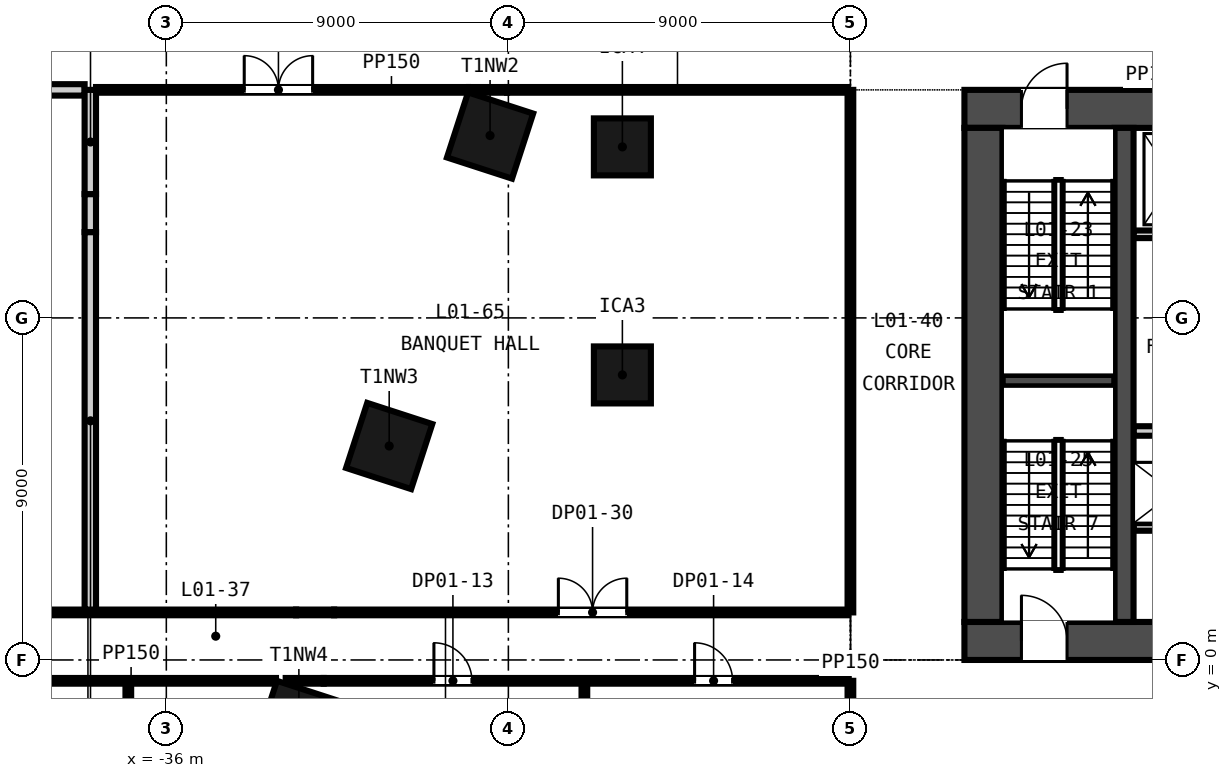
"""IFC4 building model, lengths in metres.
Left out: names, types, materials, properties, quantities, classifications, styles, units other than length and angle.
Written with IfcOpenShell. Run it as: python <this file> out.ifc"""

import sys

from ifc_helpers import new_model, si_unit, direction, frame, frame_2d, origin, origin_2d, place, context, subcontext, project, spatial, rectangle, extrude, element, fill, save


model = new_model("IFC4")
c1 = context("Model", 3, precision=1e-05, world=origin(), true_north=direction((0.0, 1.0)))
c2 = subcontext(c1, "Body", "Model", "MODEL_VIEW")
j1 = project(units=[si_unit("LENGTHUNIT", "METRE"), si_unit("PLANEANGLEUNIT", "RADIAN")], contexts=[c1])
p1 = place(None, origin())
s1 = spatial("IfcSite", under=j1, at=p1, CompositionType="ELEMENT")
p2 = place(p1, origin())
s2 = spatial("IfcBuilding", under=s1, at=p2, CompositionType="ELEMENT")
p3 = place(p2, frame((0.0, 0.0, 9.0)))
s3 = spatial("IfcBuildingStorey", under=s2, at=p3, CompositionType="ELEMENT", Elevation=9.0)
p4 = place(p3, frame((-15.0, 0.5, -0.4), z_axis=(0.0, 0.0, 1.0), x_axis=(1.0, 0.0, 0.0)))
e1 = element("IfcWall", 1, at=p4, inside=s3, PredefinedType="SOLIDWALL", context=c2, shape_type="SweptSolid", body=[
    extrude(rectangle(XDim=30.0, YDim=1.0, at=frame_2d((15.0, 0.0))), origin(), (0.0, 0.0, 1.0), 9.0),
])
p5 = place(p4, frame((5.8, 0.0, 0.4)))
e2 = element("IfcOpeningElement", 2, at=p5, cuts=e1, PredefinedType="OPENING", context=c2, shape_type="SweptSolid", body=[
    extrude(rectangle(XDim=2.4, YDim=2.4, at=frame_2d((1.2, 1.2))), frame((0.0, 0.51, 0.0), z_axis=(0.0, -1.0, 0.0), x_axis=(1.0, 0.0, 0.0)), (0.0, 0.0, 1.0), 1.02),
])
p6 = place(p4, frame((13.8, 0.0, 0.4)))
e3 = element("IfcOpeningElement", 3, at=p6, cuts=e1, PredefinedType="OPENING", context=c2, shape_type="SweptSolid", body=[
    extrude(rectangle(XDim=2.4, YDim=2.4, at=frame_2d((1.2, 1.2))), frame((0.0, 0.51, 0.0), z_axis=(0.0, -1.0, 0.0), x_axis=(1.0, 0.0, 0.0)), (0.0, 0.0, 1.0), 1.02),
])
p7 = place(p4, frame((21.8, 0.0, 0.4)))
e4 = element("IfcOpeningElement", 4, at=p7, cuts=e1, PredefinedType="OPENING", context=c2, shape_type="SweptSolid", body=[
    extrude(rectangle(XDim=2.4, YDim=2.4, at=frame_2d((1.2, 1.2))), frame((0.0, 0.51, 0.0), z_axis=(0.0, -1.0, 0.0), x_axis=(1.0, 0.0, 0.0)), (0.0, 0.0, 1.0), 1.02),
])
p8 = place(p4, frame((1.5, 0.0, 0.4)))
e5 = element("IfcOpeningElement", 5, at=p8, cuts=e1, PredefinedType="OPENING", context=c2, shape_type="SweptSolid", body=[
    extrude(rectangle(XDim=1.2, YDim=2.1, at=frame_2d((0.6, 1.05))), frame((0.0, 0.51, 0.0), z_axis=(0.0, -1.0, 0.0), x_axis=(1.0, 0.0, 0.0)), (0.0, 0.0, 1.0), 1.02),
])
p9 = place(p4, frame((27.3, 0.0, 0.4)))
e6 = element("IfcOpeningElement", 6, at=p9, cuts=e1, PredefinedType="OPENING", context=c2, shape_type="SweptSolid", body=[
    extrude(rectangle(XDim=1.2, YDim=2.1, at=frame_2d((0.6, 1.05))), frame((0.0, 0.51, 0.0), z_axis=(0.0, -1.0, 0.0), x_axis=(1.0, 0.0, 0.0)), (0.0, 0.0, 1.0), 1.02),
])
p10 = place(p3, frame((-15.0, 14.5, -0.4), z_axis=(0.0, 0.0, 1.0), x_axis=(1.0, 0.0, 0.0)))
e7 = element("IfcWall", 7, at=p10, inside=s3, PredefinedType="SOLIDWALL", context=c2, shape_type="SweptSolid", body=[
    extrude(rectangle(XDim=30.0, YDim=1.0, at=frame_2d((15.0, 0.0))), origin(), (0.0, 0.0, 1.0), 9.0),
])
p11 = place(p10, frame((9.25, 0.0, 0.4)))
e8 = element("IfcOpeningElement", 8, at=p11, cuts=e7, PredefinedType="OPENING", context=c2, shape_type="SweptSolid", body=[
    extrude(rectangle(XDim=1.5, YDim=2.1, at=frame_2d((0.75, 1.05))), frame((0.0, 0.51, 0.0), z_axis=(0.0, -1.0, 0.0), x_axis=(1.0, 0.0, 0.0)), (0.0, 0.0, 1.0), 1.02),
])
p12 = place(p10, frame((19.4, 0.0, 0.4)))
e9 = element("IfcOpeningElement", 9, at=p12, cuts=e7, PredefinedType="OPENING", context=c2, shape_type="SweptSolid", body=[
    extrude(rectangle(XDim=1.5, YDim=2.1, at=frame_2d((0.75, 1.05))), frame((0.0, 0.51, 0.0), z_axis=(0.0, -1.0, 0.0), x_axis=(1.0, 0.0, 0.0)), (0.0, 0.0, 1.0), 1.02),
])
p13 = place(p10, frame((1.5, 0.0, 0.4)))
e10 = element("IfcOpeningElement", 10, at=p13, cuts=e7, PredefinedType="OPENING", context=c2, shape_type="SweptSolid", body=[
    extrude(rectangle(XDim=1.2, YDim=2.1, at=frame_2d((0.6, 1.05))), frame((0.0, 0.51, 0.0), z_axis=(0.0, -1.0, 0.0), x_axis=(1.0, 0.0, 0.0)), (0.0, 0.0, 1.0), 1.02),
])
p14 = place(p10, frame((27.3, 0.0, 0.4)))
e11 = element("IfcOpeningElement", 11, at=p14, cuts=e7, PredefinedType="OPENING", context=c2, shape_type="SweptSolid", body=[
    extrude(rectangle(XDim=1.2, YDim=2.1, at=frame_2d((0.6, 1.05))), frame((0.0, 0.51, 0.0), z_axis=(0.0, -1.0, 0.0), x_axis=(1.0, 0.0, 0.0)), (0.0, 0.0, 1.0), 1.02),
])
p15 = place(p3, frame((-14.5, 1.0, -0.4), z_axis=(0.0, 0.0, 1.0), x_axis=(0.0, 1.0, 0.0)))
e12 = element("IfcWall", 12, at=p15, inside=s3, PredefinedType="SOLIDWALL", context=c2, shape_type="SweptSolid", body=[
    extrude(rectangle(XDim=13.0, YDim=1.0, at=frame_2d((6.5, 0.0))), origin(), (0.0, 0.0, 1.0), 9.0),
])
p16 = place(p3, frame((-10.8, 1.0, -0.4), z_axis=(0.0, 0.0, 1.0), x_axis=(0.0, 1.0, 0.0)))
e13 = element("IfcWall", 13, at=p16, inside=s3, PredefinedType="SOLIDWALL", context=c2, shape_type="SweptSolid", body=[
    extrude(rectangle(XDim=13.0, YDim=0.5, at=frame_2d((6.5, 0.0))), origin(), (0.0, 0.0, 1.0), 9.0),
])
for number, where, z_axis, x_axis in (
    (14, (-27.482, 13.799, -0.4), (0.0, 0.0, 1.0), (-0.309, -0.951, 0.0)),
    (15, (-30.136, 5.63, -0.4), (0.0, 0.0, 1.0), (-0.309, -0.951, 0.0)),
    (16, (-32.512, -1.683, -0.4), (0.0, 0.0, 1.0), (-0.309, -0.951, 0.0)),
):
    element("IfcColumn", number, at=place(p3, frame(where, z_axis=z_axis, x_axis=x_axis)), inside=s3, PredefinedType="COLUMN", context=c2, shape_type="SweptSolid", body=[
        extrude(rectangle(XDim=1.8, YDim=1.8, at=origin_2d()), origin(), (0.0, 0.0, 1.0), 9.0),
    ])
for number, where, z_axis, x_axis in (
    (17, (-24.0, 7.5, -0.4), (0.0, 0.0, 1.0), (1.0, 0.0, 0.0)),
    (18, (-24.0, 13.5, -0.4), (0.0, 0.0, 1.0), (1.0, 0.0, 0.0)),
):
    element("IfcColumn", number, at=place(p3, frame(where, z_axis=z_axis, x_axis=x_axis)), inside=s3, PredefinedType="COLUMN", context=c2, shape_type="SweptSolid", body=[
        extrude(rectangle(XDim=1.5, YDim=1.5, at=origin_2d()), origin(), (0.0, 0.0, 1.0), 9.0),
    ])
p17 = place(p3, frame((-10.55, 3.5, 0.0), z_axis=(0.0, 0.0, 1.0), x_axis=(1.0, 0.0, 0.0)))
e19 = element("IfcWall", 19, at=p17, inside=s3, PredefinedType="PARTITIONING", context=c2, shape_type="SweptSolid", body=[
    extrude(rectangle(XDim=21.1, YDim=0.2, at=frame_2d((10.55, 0.0))), origin(), (0.0, 0.0, 1.0), 8.6),
])
p18 = place(p17, frame((0.675, 0.0, 0.0)))
e20 = element("IfcOpeningElement", 20, at=p18, cuts=e19, PredefinedType="OPENING", context=c2, shape_type="SweptSolid", body=[
    extrude(rectangle(XDim=1.2, YDim=2.1, at=frame_2d((0.6, 1.05))), frame((0.0, 0.11, 0.0), z_axis=(0.0, -1.0, 0.0), x_axis=(1.0, 0.0, 0.0)), (0.0, 0.0, 1.0), 0.22),
])
p19 = place(p17, frame((3.475, 0.0, 0.0)))
e21 = element("IfcOpeningElement", 21, at=p19, cuts=e19, PredefinedType="OPENING", context=c2, shape_type="SweptSolid", body=[
    extrude(rectangle(XDim=1.2, YDim=2.1, at=frame_2d((0.6, 1.05))), frame((0.0, 0.11, 0.0), z_axis=(0.0, -1.0, 0.0), x_axis=(1.0, 0.0, 0.0)), (0.0, 0.0, 1.0), 0.22),
])
p20 = place(p17, frame((6.275, 0.0, 0.0)))
e22 = element("IfcOpeningElement", 22, at=p20, cuts=e19, PredefinedType="OPENING", context=c2, shape_type="SweptSolid", body=[
    extrude(rectangle(XDim=1.2, YDim=2.1, at=frame_2d((0.6, 1.05))), frame((0.0, 0.11, 0.0), z_axis=(0.0, -1.0, 0.0), x_axis=(1.0, 0.0, 0.0)), (0.0, 0.0, 1.0), 0.22),
])
p21 = place(p17, frame((9.075, 0.0, 0.0)))
e23 = element("IfcOpeningElement", 23, at=p21, cuts=e19, PredefinedType="OPENING", context=c2, shape_type="SweptSolid", body=[
    extrude(rectangle(XDim=1.2, YDim=2.1, at=frame_2d((0.6, 1.05))), frame((0.0, 0.11, 0.0), z_axis=(0.0, -1.0, 0.0), x_axis=(1.0, 0.0, 0.0)), (0.0, 0.0, 1.0), 0.22),
])
p22 = place(p17, frame((11.875, 0.0, 0.0)))
e24 = element("IfcOpeningElement", 24, at=p22, cuts=e19, PredefinedType="OPENING", context=c2, shape_type="SweptSolid", body=[
    extrude(rectangle(XDim=1.2, YDim=2.1, at=frame_2d((0.6, 1.05))), frame((0.0, 0.11, 0.0), z_axis=(0.0, -1.0, 0.0), x_axis=(1.0, 0.0, 0.0)), (0.0, 0.0, 1.0), 0.22),
])
p23 = place(p17, frame((14.675, 0.0, 0.0)))
e25 = element("IfcOpeningElement", 25, at=p23, cuts=e19, PredefinedType="OPENING", context=c2, shape_type="SweptSolid", body=[
    extrude(rectangle(XDim=1.2, YDim=2.1, at=frame_2d((0.6, 1.05))), frame((0.0, 0.11, 0.0), z_axis=(0.0, -1.0, 0.0), x_axis=(1.0, 0.0, 0.0)), (0.0, 0.0, 1.0), 0.22),
])
p24 = place(p17, frame((17.475, 0.0, 0.0)))
e26 = element("IfcOpeningElement", 26, at=p24, cuts=e19, PredefinedType="OPENING", context=c2, shape_type="SweptSolid", body=[
    extrude(rectangle(XDim=1.2, YDim=2.1, at=frame_2d((0.6, 1.05))), frame((0.0, 0.11, 0.0), z_axis=(0.0, -1.0, 0.0), x_axis=(1.0, 0.0, 0.0)), (0.0, 0.0, 1.0), 0.22),
])
p25 = place(p17, frame((19.9, 0.0, 0.0)))
e27 = element("IfcOpeningElement", 27, at=p25, cuts=e19, PredefinedType="OPENING", context=c2, shape_type="SweptSolid", body=[
    extrude(rectangle(XDim=0.9, YDim=2.1, at=frame_2d((0.45, 1.05))), frame((0.0, 0.11, 0.0), z_axis=(0.0, -1.0, 0.0), x_axis=(1.0, 0.0, 0.0)), (0.0, 0.0, 1.0), 0.22),
])
p26 = place(p3, frame((-10.55, 6.025, 0.0), z_axis=(0.0, 0.0, 1.0), x_axis=(1.0, 0.0, 0.0)))
e28 = element("IfcWall", 28, at=p26, inside=s3, PredefinedType="PARTITIONING", context=c2, shape_type="SweptSolid", body=[
    extrude(rectangle(XDim=21.1, YDim=0.25, at=frame_2d((10.55, 0.0))), origin(), (0.0, 0.0, 1.0), 8.6),
])
p27 = place(p3, frame((-10.55, 11.2, 0.0), z_axis=(0.0, 0.0, 1.0), x_axis=(1.0, 0.0, 0.0)))
e29 = element("IfcWall", 29, at=p27, inside=s3, PredefinedType="PARTITIONING", context=c2, shape_type="SweptSolid", body=[
    extrude(rectangle(XDim=4.8, YDim=0.2, at=frame_2d((2.4, 0.0))), origin(), (0.0, 0.0, 1.0), 8.6),
])
p28 = place(p27, frame((0.525, 0.0, 0.0)))
e30 = element("IfcOpeningElement", 30, at=p28, cuts=e29, PredefinedType="OPENING", context=c2, shape_type="SweptSolid", body=[
    extrude(rectangle(XDim=1.1, YDim=2.1, at=frame_2d((0.55, 1.05))), frame((0.0, 0.11, 0.0), z_axis=(0.0, -1.0, 0.0), x_axis=(1.0, 0.0, 0.0)), (0.0, 0.0, 1.0), 0.22),
])
p29 = place(p27, frame((2.925, 0.0, 0.0)))
e31 = element("IfcOpeningElement", 31, at=p29, cuts=e29, PredefinedType="OPENING", context=c2, shape_type="SweptSolid", body=[
    extrude(rectangle(XDim=1.1, YDim=2.1, at=frame_2d((0.55, 1.05))), frame((0.0, 0.11, 0.0), z_axis=(0.0, -1.0, 0.0), x_axis=(1.0, 0.0, 0.0)), (0.0, 0.0, 1.0), 0.22),
])
p30 = place(p3, frame((-14.0, 7.35, -0.4), z_axis=(0.0, 0.0, 1.0), x_axis=(1.0, 0.0, 0.0)))
e32 = element("IfcWall", 32, at=p30, inside=s3, PredefinedType="SOLIDWALL", context=c2, shape_type="SweptSolid", body=[
    extrude(rectangle(XDim=2.95, YDim=0.3, at=frame_2d((1.475, 0.0))), origin(), (0.0, 0.0, 1.0), 9.0),
])
p31 = place(p3, frame((-51.0, -0.549, 0.0), z_axis=(0.0, 0.0, 1.0), x_axis=(1.0, 0.0, 0.0)))
e33 = element("IfcWall", 33, at=p31, inside=s3, PredefinedType="PARTITIONING", context=c2, shape_type="SweptSolid", body=[
    extrude(rectangle(XDim=17.886, YDim=0.15, at=frame_2d((8.943, 0.0))), origin(), (0.0, 0.0, 1.0), 8.6),
])
p32 = place(p31, frame((3.4, 0.0, 0.0)))
e34 = element("IfcOpeningElement", 34, at=p32, cuts=e33, PredefinedType="OPENING", context=c2, shape_type="SweptSolid", body=[
    extrude(rectangle(XDim=1.8, YDim=2.4, at=frame_2d((0.9, 1.2))), frame((0.0, 0.085, 0.0), z_axis=(0.0, -1.0, 0.0), x_axis=(1.0, 0.0, 0.0)), (0.0, 0.0, 1.0), 0.17),
])
p33 = place(p31, frame((8.4, 0.0, 0.0)))
e35 = element("IfcOpeningElement", 35, at=p33, cuts=e33, PredefinedType="OPENING", context=c2, shape_type="SweptSolid", body=[
    extrude(rectangle(XDim=1.8, YDim=2.4, at=frame_2d((0.9, 1.2))), frame((0.0, 0.085, 0.0), z_axis=(0.0, -1.0, 0.0), x_axis=(1.0, 0.0, 0.0)), (0.0, 0.0, 1.0), 0.17),
])
p34 = place(p3, frame((-32.859, -0.549, 0.0), z_axis=(0.0, 0.0, 1.0), x_axis=(1.0, 0.0, 0.0)))
e36 = element("IfcWall", 36, at=p34, inside=s3, PredefinedType="PARTITIONING", context=c2, shape_type="SweptSolid", body=[
    extrude(rectangle(XDim=1.0, YDim=0.15, at=frame_2d((0.5, 0.0))), origin(), (0.0, 0.0, 1.0), 7.6),
])
p35 = place(p3, frame((-31.859, -0.549, 0.0), z_axis=(0.0, 0.0, 1.0), x_axis=(1.0, 0.0, 0.0)))
e37 = element("IfcWall", 37, at=p35, inside=s3, PredefinedType="PARTITIONING", context=c2, shape_type="SweptSolid", body=[
    extrude(rectangle(XDim=13.784, YDim=0.15, at=frame_2d((6.892, 0.0))), origin(), (0.0, 0.0, 1.0), 8.6),
])
p36 = place(p35, frame((2.9, 0.0, 0.0)))
e38 = element("IfcOpeningElement", 38, at=p36, cuts=e37, PredefinedType="OPENING", context=c2, shape_type="SweptSolid", body=[
    extrude(rectangle(XDim=1.0, YDim=2.1, at=frame_2d((0.5, 1.05))), frame((0.0, 0.085, 0.0), z_axis=(0.0, -1.0, 0.0), x_axis=(1.0, 0.0, 0.0)), (0.0, 0.0, 1.0), 0.17),
])
p37 = place(p35, frame((9.759, 0.0, 0.0)))
e39 = element("IfcOpeningElement", 39, at=p37, cuts=e37, PredefinedType="OPENING", context=c2, shape_type="SweptSolid", body=[
    extrude(rectangle(XDim=1.0, YDim=2.1, at=frame_2d((0.5, 1.05))), frame((0.0, 0.085, 0.0), z_axis=(0.0, -1.0, 0.0), x_axis=(1.0, 0.0, 0.0)), (0.0, 0.0, 1.0), 0.17),
])
p38 = place(p3, frame((-51.4, 1.251, 0.0), z_axis=(0.0, 0.0, 1.0), x_axis=(1.0, 0.0, 0.0)))
e40 = element("IfcWall", 40, at=p38, inside=s3, PredefinedType="PARTITIONING", context=c2, shape_type="SweptSolid", body=[
    extrude(rectangle(XDim=18.815, YDim=0.15, at=frame_2d((9.408, 0.0))), origin(), (0.0, 0.0, 1.0), 8.6),
])
p39 = place(p38, frame((5.4, 0.0, 0.0)))
e41 = element("IfcOpeningElement", 41, at=p39, cuts=e40, PredefinedType="OPENING", context=c2, shape_type="SweptSolid", body=[
    extrude(rectangle(XDim=2.4, YDim=2.4, at=frame_2d((1.2, 1.2))), frame((0.0, 0.085, 0.0), z_axis=(0.0, -1.0, 0.0), x_axis=(1.0, 0.0, 0.0)), (0.0, 0.0, 1.0), 0.17),
])
p40 = place(p3, frame((-32.584, 1.251, 0.0), z_axis=(0.0, 0.0, 1.0), x_axis=(1.0, 0.0, 0.0)))
e42 = element("IfcWall", 42, at=p40, inside=s3, PredefinedType="PARTITIONING", context=c2, shape_type="SweptSolid", body=[
    extrude(rectangle(XDim=1.0, YDim=0.15, at=frame_2d((0.5, 0.0))), origin(), (0.0, 0.0, 1.0), 7.6),
])
p41 = place(p3, frame((-31.584, 1.251, 0.0), z_axis=(0.0, 0.0, 1.0), x_axis=(1.0, 0.0, 0.0)))
e43 = element("IfcWall", 43, at=p41, inside=s3, PredefinedType="PARTITIONING", context=c2, shape_type="SweptSolid", body=[
    extrude(rectangle(XDim=13.51, YDim=0.15, at=frame_2d((6.755, 0.0))), origin(), (0.0, 0.0, 1.0), 8.6),
])
p42 = place(p41, frame((5.9, 0.0, 0.0)))
e44 = element("IfcOpeningElement", 44, at=p42, cuts=e43, PredefinedType="OPENING", context=c2, shape_type="SweptSolid", body=[
    extrude(rectangle(XDim=1.8, YDim=2.4, at=frame_2d((0.9, 1.2))), frame((0.0, 0.085, 0.0), z_axis=(0.0, -1.0, 0.0), x_axis=(1.0, 0.0, 0.0)), (0.0, 0.0, 1.0), 0.17),
])
p43 = place(p3, frame((-51.4, 15.0, 0.0), z_axis=(0.0, 0.0, 1.0), x_axis=(1.0, 0.0, 0.0)))
e45 = element("IfcWall", 45, at=p43, inside=s3, PredefinedType="PARTITIONING", context=c2, shape_type="SweptSolid", body=[
    extrude(rectangle(XDim=13.25, YDim=0.3, at=frame_2d((6.625, 0.0))), origin(), (0.0, 0.0, 1.0), 8.6),
])
p44 = place(p43, frame((5.4, 0.0, 0.0)))
e46 = element("IfcOpeningElement", 46, at=p44, cuts=e45, PredefinedType="OPENING", context=c2, shape_type="SweptSolid", body=[
    extrude(rectangle(XDim=2.4, YDim=2.4, at=frame_2d((1.2, 1.2))), frame((0.0, 0.16, 0.0), z_axis=(0.0, -1.0, 0.0), x_axis=(1.0, 0.0, 0.0)), (0.0, 0.0, 1.0), 0.32),
])
p45 = place(p3, frame((-37.85, 15.0, 0.0), z_axis=(0.0, 0.0, 1.0), x_axis=(1.0, 0.0, 0.0)))
e47 = element("IfcWall", 47, at=p45, inside=s3, PredefinedType="PARTITIONING", context=c2, shape_type="SweptSolid", body=[
    extrude(rectangle(XDim=9.788, YDim=0.15, at=frame_2d((4.894, 0.0))), origin(), (0.0, 0.0, 1.0), 8.6),
])
p46 = place(p45, frame((3.9, 0.0, 0.0)))
e48 = element("IfcOpeningElement", 48, at=p46, cuts=e47, PredefinedType="OPENING", context=c2, shape_type="SweptSolid", body=[
    extrude(rectangle(XDim=1.8, YDim=2.4, at=frame_2d((0.9, 1.2))), frame((0.0, 0.085, 0.0), z_axis=(0.0, -1.0, 0.0), x_axis=(1.0, 0.0, 0.0)), (0.0, 0.0, 1.0), 0.17),
])
p47 = place(p3, frame((-28.035, 15.0, 0.0), z_axis=(0.0, 0.0, 1.0), x_axis=(1.0, 0.0, 0.0)))
e49 = element("IfcWall", 49, at=p47, inside=s3, PredefinedType="PARTITIONING", context=c2, shape_type="SweptSolid", body=[
    extrude(rectangle(XDim=1.0, YDim=0.15, at=frame_2d((0.5, 0.0))), origin(), (0.0, 0.0, 1.0), 7.6),
])
p48 = place(p3, frame((-27.035, 15.0, 0.0), z_axis=(0.0, 0.0, 1.0), x_axis=(1.0, 0.0, 0.0)))
e50 = element("IfcWall", 50, at=p48, inside=s3, PredefinedType="PARTITIONING", context=c2, shape_type="SweptSolid", body=[
    extrude(rectangle(XDim=8.96, YDim=0.15, at=frame_2d((4.48, 0.0))), origin(), (0.0, 0.0, 1.0), 8.6),
])
p49 = place(p3, frame((-38.0, 1.326, 0.0), z_axis=(0.0, 0.0, 1.0), x_axis=(0.0, 1.0, 0.0)))
e51 = element("IfcWall", 51, at=p49, inside=s3, PredefinedType="PARTITIONING", context=c2, shape_type="SweptSolid", body=[
    extrude(rectangle(XDim=9.932, YDim=0.3, at=frame_2d((4.966, 0.0))), origin(), (0.0, 0.0, 1.0), 8.6),
])
p50 = place(p3, frame((-38.0, 11.258, 0.0), z_axis=(0.0, 0.0, 1.0), x_axis=(0.0, 1.0, 0.0)))
e52 = element("IfcWall", 52, at=p50, inside=s3, PredefinedType="PARTITIONING", context=c2, shape_type="SweptSolid", body=[
    extrude(rectangle(XDim=1.0, YDim=0.3, at=frame_2d((0.5, 0.0))), origin(), (0.0, 0.0, 1.0), 7.619),
])
p51 = place(p3, frame((-38.0, 12.258, 0.0), z_axis=(0.0, 0.0, 1.0), x_axis=(0.0, 1.0, 0.0)))
e53 = element("IfcWall", 53, at=p51, inside=s3, PredefinedType="PARTITIONING", context=c2, shape_type="SweptSolid", body=[
    extrude(rectangle(XDim=2.742, YDim=0.3, at=frame_2d((1.371, 0.0))), origin(), (0.0, 0.0, 1.0), 8.6),
])
for number, where, z_axis, x_axis in (
    (54, (-37.0, -9.4, 0.0), (0.0, 0.0, 1.0), (0.0, 1.0, 0.0)),
    (55, (-25.0, -9.4, 0.0), (0.0, 0.0, 1.0), (0.0, 1.0, 0.0)),
):
    element("IfcWall", number, at=place(p3, frame(where, z_axis=z_axis, x_axis=x_axis)), inside=s3, PredefinedType="PARTITIONING", context=c2, shape_type="SweptSolid", body=[
        extrude(rectangle(XDim=8.776, YDim=0.15, at=frame_2d((4.388, 0.0))), origin(), (0.0, 0.0, 1.0), 8.6),
    ])
p52 = place(p3, frame((-18.0, -3.2, 0.0), z_axis=(0.0, 0.0, 1.0), x_axis=(0.0, 1.0, 0.0)))
e56 = element("IfcWall", 56, at=p52, inside=s3, PredefinedType="PARTITIONING", context=c2, shape_type="SweptSolid", body=[
    extrude(rectangle(XDim=2.651, YDim=0.15, at=frame_2d((1.326, 0.0))), origin(), (0.0, 0.0, 1.0), 8.6),
])
p53 = place(p3, frame((-18.0, 1.251, 0.0), z_axis=(0.0, 0.0, 1.0), x_axis=(0.0, 1.0, 0.0)))
e57 = element("IfcWall", 57, at=p53, inside=s3, PredefinedType="PARTITIONING", context=c2, shape_type="SweptSolid", body=[
    extrude(rectangle(XDim=13.749, YDim=0.15, at=frame_2d((6.875, 0.0))), origin(), (0.0, 0.0, 1.0), 8.6),
])
p54 = place(p13, origin())
e58 = element("IfcDoor", 58, at=p54, inside=s3, OperationType="SINGLE_SWING_RIGHT", PredefinedType="DOOR", context=c2, shape_type="SweptSolid", body=[
    extrude(rectangle(XDim=1.2, YDim=2.1, at=frame_2d((0.6, 1.05))), frame((0.0, 0.025, 0.0), z_axis=(0.0, -1.0, 0.0), x_axis=(1.0, 0.0, 0.0)), (0.0, 0.0, 1.0), 0.05),
])
fill(e10, e58)
p55 = place(p8, origin())
e59 = element("IfcDoor", 59, at=p55, inside=s3, OperationType="SINGLE_SWING_LEFT", PredefinedType="DOOR", context=c2, shape_type="SweptSolid", body=[
    extrude(rectangle(XDim=1.2, YDim=2.1, at=frame_2d((0.6, 1.05))), frame((0.0, 0.025, 0.0), z_axis=(0.0, -1.0, 0.0), x_axis=(1.0, 0.0, 0.0)), (0.0, 0.0, 1.0), 0.05),
])
fill(e5, e59)
p56 = place(p36, origin())
e60 = element("IfcDoor", 60, at=p56, inside=s3, OperationType="SINGLE_SWING_LEFT", PredefinedType="DOOR", context=c2, shape_type="SweptSolid", body=[
    extrude(rectangle(XDim=1.0, YDim=2.1, at=frame_2d((0.5, 1.05))), frame((0.0, 0.025, 0.0), z_axis=(0.0, -1.0, 0.0), x_axis=(1.0, 0.0, 0.0)), (0.0, 0.0, 1.0), 0.05),
])
fill(e38, e60)
p57 = place(p37, origin())
e61 = element("IfcDoor", 61, at=p57, inside=s3, OperationType="SINGLE_SWING_LEFT", PredefinedType="DOOR", context=c2, shape_type="SweptSolid", body=[
    extrude(rectangle(XDim=1.0, YDim=2.1, at=frame_2d((0.5, 1.05))), frame((0.0, 0.025, 0.0), z_axis=(0.0, -1.0, 0.0), x_axis=(1.0, 0.0, 0.0)), (0.0, 0.0, 1.0), 0.05),
])
fill(e39, e61)
p58 = place(p42, origin())
e62 = element("IfcDoor", 62, at=p58, inside=s3, OperationType="SINGLE_SWING_LEFT", PredefinedType="DOOR", context=c2, shape_type="SweptSolid", body=[
    extrude(rectangle(XDim=1.8, YDim=2.4, at=frame_2d((0.9, 1.2))), frame((0.0, 0.025, 0.0), z_axis=(0.0, -1.0, 0.0), x_axis=(1.0, 0.0, 0.0)), (0.0, 0.0, 1.0), 0.05),
])
fill(e44, e62)
p59 = place(p46, origin())
e63 = element("IfcDoor", 63, at=p59, inside=s3, OperationType="SINGLE_SWING_LEFT", PredefinedType="DOOR", context=c2, shape_type="SweptSolid", body=[
    extrude(rectangle(XDim=1.8, YDim=2.4, at=frame_2d((0.9, 1.2))), frame((0.0, 0.025, 0.0), z_axis=(0.0, -1.0, 0.0), x_axis=(1.0, 0.0, 0.0)), (0.0, 0.0, 1.0), 0.05),
])
fill(e48, e63)
save(model, sys.argv[1])
